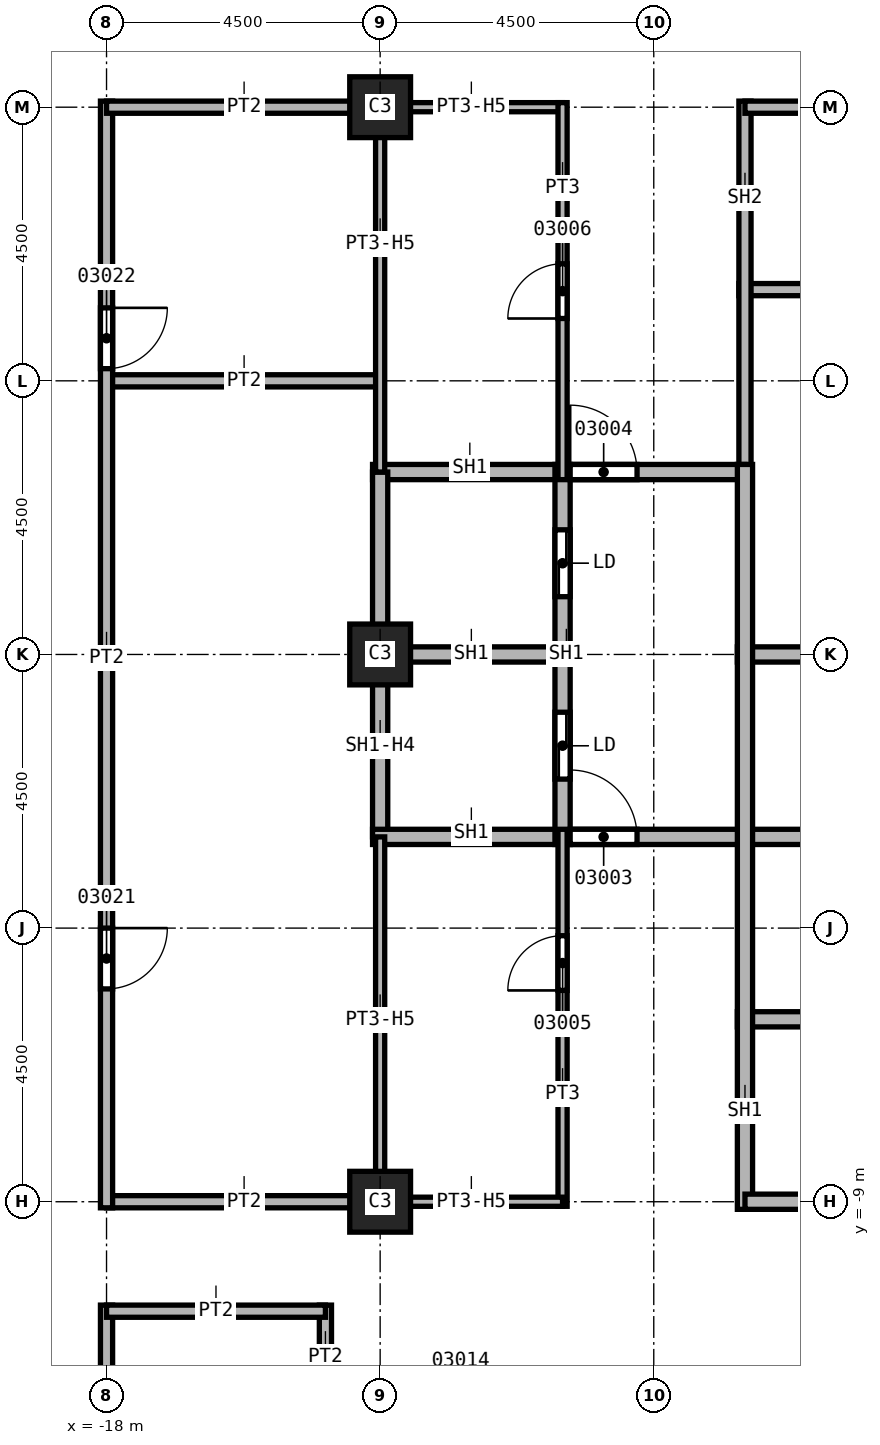
"""IFC4 building model, lengths in metres.
Left out: names, types, materials, properties, quantities, classifications, styles, units other than length and angle.
Written with IfcOpenShell. Run it as: python <this file> out.ifc"""

import sys

from ifc_helpers import new_model, si_unit, direction, frame, frame_2d, origin, origin_2d, place, context, subcontext, project, spatial, rectangle, extrude, element, fill, save


model = new_model("IFC4")
c1 = context("Model", 3, precision=1e-05, world=origin(), true_north=direction((0.0, 1.0)))
c2 = subcontext(c1, "Body", "Model", "MODEL_VIEW")
j1 = project(units=[si_unit("LENGTHUNIT", "METRE"), si_unit("PLANEANGLEUNIT", "RADIAN")], contexts=[c1])
p1 = place(None, origin())
s1 = spatial("IfcSite", under=j1, at=p1, CompositionType="ELEMENT")
p2 = place(p1, origin())
s2 = spatial("IfcBuilding", under=s1, at=p2, CompositionType="ELEMENT")
p3 = place(p2, frame((0.0, 0.0, 92.0)))
s3 = spatial("IfcBuildingStorey", under=s2, at=p3, CompositionType="ELEMENT", Elevation=92.0)
for number, where, z_axis, x_axis in (
    (1, (-13.5, 0.0, 0.0), (0.0, 0.0, 1.0), (1.0, 0.0, 0.0)),
    (2, (-13.5, 9.0, 0.0), (0.0, 0.0, 1.0), (1.0, 0.0, 0.0)),
    (3, (-13.5, -9.0, 0.0), (0.0, 0.0, 1.0), (1.0, 0.0, 0.0)),
):
    element("IfcColumn", number, at=place(p3, frame(where, z_axis=z_axis, x_axis=x_axis)), inside=s3, PredefinedType="COLUMN", context=c2, shape_type="SweptSolid", body=[
        extrude(rectangle(XDim=1.0, YDim=1.0, at=origin_2d()), origin(), (0.0, 0.0, 1.0), 3.7),
    ])
p4 = place(p3, frame((-18.0, -10.7, 0.0), z_axis=(0.0, 0.0, 1.0), x_axis=(0.0, -1.0, 0.0)))
e4 = element("IfcWall", 4, at=p4, inside=s3, PredefinedType="PARTITIONING", context=c2, shape_type="SweptSolid", body=[
    extrude(rectangle(XDim=13.5, YDim=0.2, at=frame_2d((6.75, 0.0))), origin(), (0.0, 0.0, 1.0), 3.7),
])
p5 = place(p4, frame((4.4, 0.0, 0.0)))
e5 = element("IfcOpeningElement", 5, at=p5, cuts=e4, PredefinedType="OPENING", context=c2, shape_type="SweptSolid", body=[
    extrude(rectangle(XDim=1.0, YDim=2.1, at=frame_2d((0.5, 1.05))), frame((0.0, 0.1, 0.0), z_axis=(0.0, -1.0, 0.0), x_axis=(1.0, 0.0, 0.0)), (0.0, 0.0, 1.0), 0.2),
])
for number, where, z_axis, x_axis in (
    (6, (-18.0, -9.0, 0.0), (0.0, 0.0, 1.0), (1.0, 0.0, 0.0)),
    (7, (-18.0, 4.5, 0.0), (0.0, 0.0, 1.0), (1.0, 0.0, 0.0)),
):
    element("IfcWall", number, at=place(p3, frame(where, z_axis=z_axis, x_axis=x_axis)), inside=s3, PredefinedType="PARTITIONING", context=c2, shape_type="SweptSolid", body=[
        extrude(rectangle(XDim=4.5, YDim=0.2, at=frame_2d((2.25, 0.0))), origin(), (0.0, 0.0, 1.0), 3.7),
    ])
p6 = place(p3, frame((-18.0, 9.1, 0.0), z_axis=(0.0, 0.0, 1.0), x_axis=(0.0, -1.0, 0.0)))
e8 = element("IfcWall", 8, at=p6, inside=s3, PredefinedType="PARTITIONING", context=c2, shape_type="SweptSolid", body=[
    extrude(rectangle(XDim=18.2, YDim=0.2, at=frame_2d((9.1, 0.0))), origin(), (0.0, 0.0, 1.0), 3.7),
])
p7 = place(p6, frame((13.6, 0.0, 0.0)))
e9 = element("IfcOpeningElement", 9, at=p7, cuts=e8, PredefinedType="OPENING", context=c2, shape_type="SweptSolid", body=[
    extrude(rectangle(XDim=1.0, YDim=2.1, at=frame_2d((0.5, 1.05))), frame((0.0, 0.1, 0.0), z_axis=(0.0, -1.0, 0.0), x_axis=(1.0, 0.0, 0.0)), (0.0, 0.0, 1.0), 0.2),
])
p8 = place(p6, frame((3.4, 0.0, 0.0)))
e10 = element("IfcOpeningElement", 10, at=p8, cuts=e8, PredefinedType="OPENING", context=c2, shape_type="SweptSolid", body=[
    extrude(rectangle(XDim=1.0, YDim=2.1, at=frame_2d((0.5, 1.05))), frame((0.0, 0.1, 0.0), z_axis=(0.0, -1.0, 0.0), x_axis=(1.0, 0.0, 0.0)), (0.0, 0.0, 1.0), 0.2),
])
p9 = place(p3, frame((-14.4, -12.3, 0.0), z_axis=(0.0, 0.0, 1.0), x_axis=(0.0, 1.0, 0.0)))
e11 = element("IfcWall", 11, at=p9, inside=s3, PredefinedType="PARTITIONING", context=c2, shape_type="SweptSolid", body=[
    extrude(rectangle(XDim=1.6, YDim=0.2, at=frame_2d((0.8, 0.0))), origin(), (0.0, 0.0, 1.0), 3.7),
])
p10 = place(p3, frame((-14.4, -10.8, 0.0), z_axis=(0.0, 0.0, 1.0), x_axis=(-1.0, 0.0, 0.0)))
e12 = element("IfcWall", 12, at=p10, inside=s3, PredefinedType="PARTITIONING", context=c2, shape_type="SweptSolid", body=[
    extrude(rectangle(XDim=3.6, YDim=0.2, at=frame_2d((1.8, 0.0))), origin(), (0.0, 0.0, 1.0), 3.7),
])
p11 = place(p3, frame((-13.5, 9.0, 0.0), z_axis=(0.0, 0.0, 1.0), x_axis=(-1.0, 0.0, 0.0)))
e13 = element("IfcWall", 13, at=p11, inside=s3, PredefinedType="PARTITIONING", context=c2, shape_type="SweptSolid", body=[
    extrude(rectangle(XDim=4.5, YDim=0.2, at=frame_2d((2.25, 0.0))), origin(), (0.0, 0.0, 1.0), 3.7),
])
p12 = place(p3, frame((-7.6, 6.0, 0.0), z_axis=(0.0, 0.0, 1.0), x_axis=(1.0, 0.0, 0.0)))
e14 = element("IfcWall", 14, at=p12, inside=s3, PredefinedType="SOLIDWALL", context=c2, shape_type="SweptSolid", body=[
    extrude(rectangle(XDim=3.2, YDim=0.2, at=frame_2d((1.6, 0.0))), origin(), (0.0, 0.0, 1.0), 3.7),
])
p13 = place(p3, frame((-7.5, 2.875, 0.0), z_axis=(0.0, 0.0, 1.0), x_axis=(0.0, 1.0, 0.0)))
e15 = element("IfcWall", 15, at=p13, inside=s3, PredefinedType="SOLIDWALL", context=c2, shape_type="SweptSolid", body=[
    extrude(rectangle(XDim=6.225, YDim=0.2, at=frame_2d((3.113, 0.0))), origin(), (0.0, 0.0, 1.0), 3.7),
])
p14 = place(p3, frame((-7.5, 9.0, 0.0), z_axis=(0.0, 0.0, 1.0), x_axis=(1.0, 0.0, 0.0)))
e16 = element("IfcWall", 16, at=p14, inside=s3, PredefinedType="SOLIDWALL", context=c2, shape_type="SweptSolid", body=[
    extrude(rectangle(XDim=3.0, YDim=0.2, at=frame_2d((1.5, 0.0))), origin(), (0.0, 0.0, 1.0), 2.938),
])
p15 = place(p3, frame((-13.625, 0.0, 0.0), z_axis=(0.0, 0.0, 1.0), x_axis=(1.0, 0.0, 0.0)))
e17 = element("IfcWall", 17, at=p15, inside=s3, PredefinedType="SOLIDWALL", context=c2, shape_type="SweptSolid", body=[
    extrude(rectangle(XDim=3.125, YDim=0.25, at=frame_2d((1.562, 0.0))), origin(), (0.0, 0.0, 1.0), 3.7),
])
p16 = place(p3, frame((-13.625, 3.0, 0.0), z_axis=(0.0, 0.0, 1.0), x_axis=(1.0, 0.0, 0.0)))
e18 = element("IfcWall", 18, at=p16, inside=s3, PredefinedType="SOLIDWALL", context=c2, shape_type="SweptSolid", body=[
    extrude(rectangle(XDim=6.125, YDim=0.25, at=frame_2d((3.062, 0.0))), origin(), (0.0, 0.0, 1.0), 3.7),
])
p17 = place(p16, frame((3.25, 0.0, 0.0)))
e19 = element("IfcOpeningElement", 19, at=p17, cuts=e18, PredefinedType="OPENING", context=c2, shape_type="SweptSolid", body=[
    extrude(rectangle(XDim=1.1, YDim=2.1, at=frame_2d((0.55, 1.05))), frame((0.0, 0.125, 0.0), z_axis=(0.0, -1.0, 0.0), x_axis=(1.0, 0.0, 0.0)), (0.0, 0.0, 1.0), 0.25),
])
p18 = place(p3, frame((-13.5, -3.0, 0.0), z_axis=(0.0, 0.0, 1.0), x_axis=(0.0, 1.0, 0.0)))
e20 = element("IfcWall", 20, at=p18, inside=s3, PredefinedType="SOLIDWALL", context=c2, shape_type="SweptSolid", body=[
    extrude(rectangle(XDim=6.0, YDim=0.25, at=frame_2d((3.0, 0.0))), origin(), (0.0, 0.0, 1.0), 2.938),
])
p19 = place(p3, frame((-13.625, -3.0, 0.0), z_axis=(0.0, 0.0, 1.0), x_axis=(1.0, 0.0, 0.0)))
e21 = element("IfcWall", 21, at=p19, inside=s3, PredefinedType="SOLIDWALL", context=c2, shape_type="SweptSolid", body=[
    extrude(rectangle(XDim=9.25, YDim=0.25, at=frame_2d((4.625, 0.0))), origin(), (0.0, 0.0, 1.0), 3.7),
])
p20 = place(p19, frame((3.25, 0.0, 0.0)))
e22 = element("IfcOpeningElement", 22, at=p20, cuts=e21, PredefinedType="OPENING", context=c2, shape_type="SweptSolid", body=[
    extrude(rectangle(XDim=1.1, YDim=2.1, at=frame_2d((0.55, 1.05))), frame((0.0, 0.125, 0.0), z_axis=(0.0, -1.0, 0.0), x_axis=(1.0, 0.0, 0.0)), (0.0, 0.0, 1.0), 0.25),
])
p21 = place(p3, frame((-10.5, -3.125, 0.0), z_axis=(0.0, 0.0, 1.0), x_axis=(0.0, 1.0, 0.0)))
e23 = element("IfcWall", 23, at=p21, inside=s3, PredefinedType="SOLIDWALL", context=c2, shape_type="SweptSolid", body=[
    extrude(rectangle(XDim=6.25, YDim=0.25, at=frame_2d((3.125, 0.0))), origin(), (0.0, 0.0, 1.0), 3.7),
])
p22 = place(p21, frame((1.075, 0.0, 0.0)))
e24 = element("IfcOpeningElement", 24, at=p22, cuts=e23, PredefinedType="OPENING", context=c2, shape_type="SweptSolid", body=[
    extrude(rectangle(XDim=1.1, YDim=2.1, at=frame_2d((0.55, 1.05))), frame((0.0, 0.125, 0.0), z_axis=(0.0, -1.0, 0.0), x_axis=(1.0, 0.0, 0.0)), (0.0, 0.0, 1.0), 0.25),
])
p23 = place(p21, frame((4.075, 0.0, 0.0)))
e25 = element("IfcOpeningElement", 25, at=p23, cuts=e23, PredefinedType="OPENING", context=c2, shape_type="SweptSolid", body=[
    extrude(rectangle(XDim=1.1, YDim=2.1, at=frame_2d((0.55, 1.05))), frame((0.0, 0.125, 0.0), z_axis=(0.0, -1.0, 0.0), x_axis=(1.0, 0.0, 0.0)), (0.0, 0.0, 1.0), 0.25),
])
for number, where, z_axis, x_axis in (
    (26, (-7.625, -6.0, 0.0), (0.0, 0.0, 1.0), (1.0, 0.0, 0.0)),
    (27, (-7.625, 0.0, 0.0), (0.0, 0.0, 1.0), (1.0, 0.0, 0.0)),
):
    element("IfcWall", number, at=place(p3, frame(where, z_axis=z_axis, x_axis=x_axis)), inside=s3, PredefinedType="SOLIDWALL", context=c2, shape_type="SweptSolid", body=[
        extrude(rectangle(XDim=3.25, YDim=0.25, at=frame_2d((1.625, 0.0))), origin(), (0.0, 0.0, 1.0), 3.7),
    ])
p24 = place(p3, frame((-7.5, -9.125, 0.0), z_axis=(0.0, 0.0, 1.0), x_axis=(0.0, 1.0, 0.0)))
e28 = element("IfcWall", 28, at=p24, inside=s3, PredefinedType="SOLIDWALL", context=c2, shape_type="SweptSolid", body=[
    extrude(rectangle(XDim=12.25, YDim=0.25, at=frame_2d((6.125, 0.0))), origin(), (0.0, 0.0, 1.0), 3.7),
])
p25 = place(p3, frame((-4.5, -9.0, 0.0), z_axis=(0.0, 0.0, 1.0), x_axis=(-1.0, 0.0, 0.0)))
e29 = element("IfcWall", 29, at=p25, inside=s3, PredefinedType="SOLIDWALL", context=c2, shape_type="SweptSolid", body=[
    extrude(rectangle(XDim=3.0, YDim=0.25, at=frame_2d((1.5, 0.0))), origin(), (0.0, 0.0, 1.0), 2.938),
])
p26 = place(p3, frame((-13.575, 9.0, 0.0), z_axis=(0.0, 0.0, 1.0), x_axis=(1.0, 0.0, 0.0)))
e30 = element("IfcWall", 30, at=p26, inside=s3, PredefinedType="PARTITIONING", context=c2, shape_type="SweptSolid", body=[
    extrude(rectangle(XDim=3.075, YDim=0.15, at=frame_2d((1.538, 0.0))), origin(), (0.0, 0.0, 1.0), 2.938),
])
for number, where, z_axis, x_axis in (
    (31, (-13.5, -9.1, 0.0), (0.0, 0.0, 1.0), (0.0, 1.0, 0.0)),
    (32, (-13.5, 3.0, 0.0), (0.0, 0.0, 1.0), (0.0, 1.0, 0.0)),
):
    element("IfcWall", number, at=place(p3, frame(where, z_axis=z_axis, x_axis=x_axis)), inside=s3, PredefinedType="PARTITIONING", context=c2, shape_type="SweptSolid", body=[
        extrude(rectangle(XDim=6.1, YDim=0.15, at=frame_2d((3.05, 0.0))), origin(), (0.0, 0.0, 1.0), 2.938),
    ])
p27 = place(p3, frame((-10.5, -9.075, 0.0), z_axis=(0.0, 0.0, 1.0), x_axis=(0.0, 1.0, 0.0)))
e33 = element("IfcWall", 33, at=p27, inside=s3, PredefinedType="PARTITIONING", context=c2, shape_type="SweptSolid", body=[
    extrude(rectangle(XDim=6.2, YDim=0.15, at=frame_2d((3.1, 0.0))), origin(), (0.0, 0.0, 1.0), 3.7),
])
p28 = place(p27, frame((3.55, 0.0, 0.0)))
e34 = element("IfcOpeningElement", 34, at=p28, cuts=e33, PredefinedType="OPENING", context=c2, shape_type="SweptSolid", body=[
    extrude(rectangle(XDim=0.9, YDim=2.1, at=frame_2d((0.45, 1.05))), frame((0.0, 0.075, 0.0), z_axis=(0.0, -1.0, 0.0), x_axis=(1.0, 0.0, 0.0)), (0.0, 0.0, 1.0), 0.15),
])
p29 = place(p3, frame((-10.5, -9.0, 0.0), z_axis=(0.0, 0.0, 1.0), x_axis=(-1.0, 0.0, 0.0)))
e35 = element("IfcWall", 35, at=p29, inside=s3, PredefinedType="PARTITIONING", context=c2, shape_type="SweptSolid", body=[
    extrude(rectangle(XDim=3.075, YDim=0.15, at=frame_2d((1.538, 0.0))), origin(), (0.0, 0.0, 1.0), 2.938),
])
p30 = place(p3, frame((-10.5, 2.875, 0.0), z_axis=(0.0, 0.0, 1.0), x_axis=(0.0, 1.0, 0.0)))
e36 = element("IfcWall", 36, at=p30, inside=s3, PredefinedType="PARTITIONING", context=c2, shape_type="SweptSolid", body=[
    extrude(rectangle(XDim=6.2, YDim=0.15, at=frame_2d((3.1, 0.0))), origin(), (0.0, 0.0, 1.0), 3.7),
])
p31 = place(p30, frame((2.65, 0.0, 0.0)))
e37 = element("IfcOpeningElement", 37, at=p31, cuts=e36, PredefinedType="OPENING", context=c2, shape_type="SweptSolid", body=[
    extrude(rectangle(XDim=0.9, YDim=2.1, at=frame_2d((0.45, 1.05))), frame((0.0, 0.075, 0.0), z_axis=(0.0, -1.0, 0.0), x_axis=(1.0, 0.0, 0.0)), (0.0, 0.0, 1.0), 0.15),
])
p32 = place(p20, origin())
e38 = element("IfcDoor", 38, at=p32, inside=s3, OperationType="SINGLE_SWING_RIGHT", PredefinedType="DOOR", context=c2, shape_type="SweptSolid", body=[
    extrude(rectangle(XDim=1.1, YDim=2.1, at=frame_2d((0.55, 1.05))), frame((0.0, 0.025, 0.0), z_axis=(0.0, -1.0, 0.0), x_axis=(1.0, 0.0, 0.0)), (0.0, 0.0, 1.0), 0.05),
])
fill(e22, e38)
p33 = place(p17, origin())
e39 = element("IfcDoor", 39, at=p33, inside=s3, OperationType="SINGLE_SWING_LEFT", PredefinedType="DOOR", context=c2, shape_type="SweptSolid", body=[
    extrude(rectangle(XDim=1.1, YDim=2.1, at=frame_2d((0.55, 1.05))), frame((0.0, 0.025, 0.0), z_axis=(0.0, -1.0, 0.0), x_axis=(1.0, 0.0, 0.0)), (0.0, 0.0, 1.0), 0.05),
])
fill(e19, e39)
p34 = place(p28, origin())
e40 = element("IfcDoor", 40, at=p34, inside=s3, OperationType="SINGLE_SWING_RIGHT", PredefinedType="DOOR", context=c2, shape_type="SweptSolid", body=[
    extrude(rectangle(XDim=0.9, YDim=2.1, at=frame_2d((0.45, 1.05))), frame((0.0, 0.025, 0.0), z_axis=(0.0, -1.0, 0.0), x_axis=(1.0, 0.0, 0.0)), (0.0, 0.0, 1.0), 0.05),
])
fill(e34, e40)
p35 = place(p31, origin())
e41 = element("IfcDoor", 41, at=p35, inside=s3, OperationType="SINGLE_SWING_LEFT", PredefinedType="DOOR", context=c2, shape_type="SweptSolid", body=[
    extrude(rectangle(XDim=0.9, YDim=2.1, at=frame_2d((0.45, 1.05))), frame((0.0, 0.025, 0.0), z_axis=(0.0, -1.0, 0.0), x_axis=(1.0, 0.0, 0.0)), (0.0, 0.0, 1.0), 0.05),
])
fill(e37, e41)
p36 = place(p7, origin())
e42 = element("IfcDoor", 42, at=p36, inside=s3, OperationType="SINGLE_SWING_RIGHT", PredefinedType="DOOR", context=c2, shape_type="SweptSolid", body=[
    extrude(rectangle(XDim=1.0, YDim=2.1, at=frame_2d((0.5, 1.05))), frame((0.0, 0.025, 0.0), z_axis=(0.0, -1.0, 0.0), x_axis=(1.0, 0.0, 0.0)), (0.0, 0.0, 1.0), 0.05),
])
fill(e9, e42)
p37 = place(p8, origin())
e43 = element("IfcDoor", 43, at=p37, inside=s3, OperationType="SINGLE_SWING_LEFT", PredefinedType="DOOR", context=c2, shape_type="SweptSolid", body=[
    extrude(rectangle(XDim=1.0, YDim=2.1, at=frame_2d((0.5, 1.05))), frame((0.0, 0.025, 0.0), z_axis=(0.0, -1.0, 0.0), x_axis=(1.0, 0.0, 0.0)), (0.0, 0.0, 1.0), 0.05),
])
fill(e10, e43)
p38 = place(p22, origin())
e44 = element("IfcDoor", 44, at=p38, inside=s3, OperationType="SLIDING_TO_LEFT", PredefinedType="DOOR", context=c2, shape_type="SweptSolid", body=[
    extrude(rectangle(XDim=1.1, YDim=2.1, at=frame_2d((0.55, 1.05))), frame((0.0, 0.025, 0.0), z_axis=(0.0, -1.0, 0.0), x_axis=(1.0, 0.0, 0.0)), (0.0, 0.0, 1.0), 0.05),
])
fill(e24, e44)
p39 = place(p23, origin())
e45 = element("IfcDoor", 45, at=p39, inside=s3, OperationType="SLIDING_TO_LEFT", PredefinedType="DOOR", context=c2, shape_type="SweptSolid", body=[
    extrude(rectangle(XDim=1.1, YDim=2.1, at=frame_2d((0.55, 1.05))), frame((0.0, 0.025, 0.0), z_axis=(0.0, -1.0, 0.0), x_axis=(1.0, 0.0, 0.0)), (0.0, 0.0, 1.0), 0.05),
])
fill(e25, e45)
save(model, sys.argv[1])
